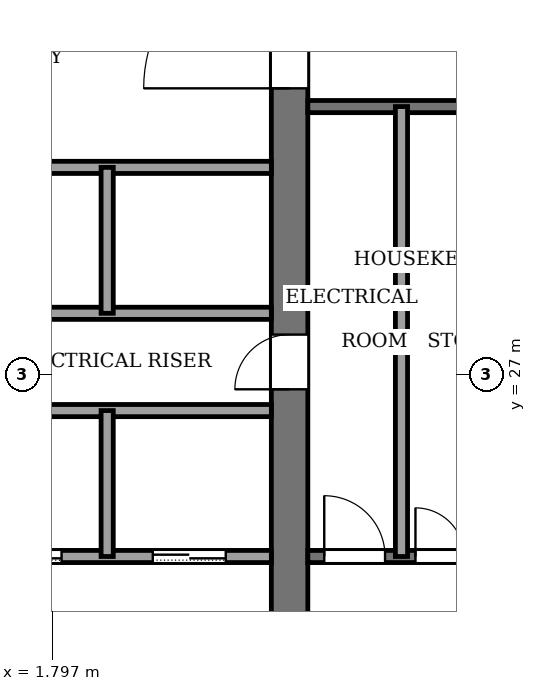
"""IFC4 building model, lengths in metres.
Left out: names, types, materials, properties, quantities, classifications, styles, units other than length and angle.
Written with IfcOpenShell. Run it as: python <this file> out.ifc"""

import sys

from ifc_helpers import new_model, si_unit, direction, frame, frame_2d, origin, place, context, subcontext, project, spatial, rectangle, extrude, element, fill, save


model = new_model("IFC4")
c1 = context("Model", 3, precision=1e-05, world=origin(), true_north=direction((0.0, 1.0)))
c2 = subcontext(c1, "Body", "Model", "MODEL_VIEW")
j1 = project(units=[si_unit("LENGTHUNIT", "METRE"), si_unit("PLANEANGLEUNIT", "RADIAN")], contexts=[c1])
p1 = place(None, origin())
s1 = spatial("IfcSite", under=j1, at=p1, CompositionType="ELEMENT")
p2 = place(p1, origin())
s2 = spatial("IfcBuilding", under=s1, at=p2, CompositionType="ELEMENT")
p3 = place(p2, frame((0.0, 0.0, 134.0)))
s3 = spatial("IfcBuildingStorey", under=s2, at=p3, CompositionType="ELEMENT", Elevation=134.0)
p4 = place(p3, frame((5.7, 18.4, -0.13), z_axis=(0.0, 0.0, 1.0), x_axis=(0.0, 1.0, 0.0)))
e1 = element("IfcWall", 1, at=p4, inside=s3, PredefinedType="SHEAR", context=c2, shape_type="SweptSolid", body=[
    extrude(rectangle(XDim=19.2, YDim=0.6, at=frame_2d((9.6, 0.0))), origin(), (0.0, 0.0, 1.0), 4.0),
])
p5 = place(p4, frame((8.35, 0.0, 0.13)))
e2 = element("IfcOpeningElement", 2, at=p5, cuts=e1, PredefinedType="OPENING", context=c2, shape_type="SweptSolid", body=[
    extrude(rectangle(XDim=0.9, YDim=2.1, at=frame_2d((0.45, 1.05))), frame((0.0, 0.31, 0.0), z_axis=(0.0, -1.0, 0.0), x_axis=(1.0, 0.0, 0.0)), (0.0, 0.0, 1.0), 0.62),
])
p6 = place(p4, frame((13.3, 0.0, 0.13)))
e3 = element("IfcOpeningElement", 3, at=p6, cuts=e1, PredefinedType="OPENING", context=c2, shape_type="SweptSolid", body=[
    extrude(rectangle(XDim=2.4, YDim=2.4, at=frame_2d((1.2, 1.2))), frame((0.0, 0.31, 0.0), z_axis=(0.0, -1.0, 0.0), x_axis=(1.0, 0.0, 0.0)), (0.0, 0.0, 1.0), 0.62),
])
p7 = place(p3, frame((-5.4, 24.0, 0.0), z_axis=(0.0, 0.0, 1.0), x_axis=(1.0, 0.0, 0.0)))
e4 = element("IfcWall", 4, at=p7, inside=s3, PredefinedType="PARTITIONING", context=c2, shape_type="SweptSolid", body=[
    extrude(rectangle(XDim=10.8, YDim=0.2, at=frame_2d((5.4, 0.0))), origin(), (0.0, 0.0, 1.0), 3.87),
])
p8 = place(p7, frame((0.75, 0.0, 0.0)))
e5 = element("IfcOpeningElement", 5, at=p8, cuts=e4, PredefinedType="OPENING", context=c2, shape_type="SweptSolid", body=[
    extrude(rectangle(XDim=1.2, YDim=2.2, at=frame_2d((0.6, 1.1))), frame((0.0, 0.11, 0.0), z_axis=(0.0, -1.0, 0.0), x_axis=(1.0, 0.0, 0.0)), (0.0, 0.0, 1.0), 0.22),
])
p9 = place(p7, frame((3.45, 0.0, 0.0)))
e6 = element("IfcOpeningElement", 6, at=p9, cuts=e4, PredefinedType="OPENING", context=c2, shape_type="SweptSolid", body=[
    extrude(rectangle(XDim=1.2, YDim=2.2, at=frame_2d((0.6, 1.1))), frame((0.0, 0.11, 0.0), z_axis=(0.0, -1.0, 0.0), x_axis=(1.0, 0.0, 0.0)), (0.0, 0.0, 1.0), 0.22),
])
p10 = place(p7, frame((6.15, 0.0, 0.0)))
e7 = element("IfcOpeningElement", 7, at=p10, cuts=e4, PredefinedType="OPENING", context=c2, shape_type="SweptSolid", body=[
    extrude(rectangle(XDim=1.2, YDim=2.2, at=frame_2d((0.6, 1.1))), frame((0.0, 0.11, 0.0), z_axis=(0.0, -1.0, 0.0), x_axis=(1.0, 0.0, 0.0)), (0.0, 0.0, 1.0), 0.22),
])
p11 = place(p7, frame((8.85, 0.0, 0.0)))
e8 = element("IfcOpeningElement", 8, at=p11, cuts=e4, PredefinedType="OPENING", context=c2, shape_type="SweptSolid", body=[
    extrude(rectangle(XDim=1.2, YDim=2.2, at=frame_2d((0.6, 1.1))), frame((0.0, 0.11, 0.0), z_axis=(0.0, -1.0, 0.0), x_axis=(1.0, 0.0, 0.0)), (0.0, 0.0, 1.0), 0.22),
])
p12 = place(p3, frame((6.0, 24.0, 0.0), z_axis=(0.0, 0.0, 1.0), x_axis=(1.0, 0.0, 0.0)))
e9 = element("IfcWall", 9, at=p12, inside=s3, PredefinedType="PARTITIONING", context=c2, shape_type="SweptSolid", body=[
    extrude(rectangle(XDim=6.6, YDim=0.2, at=frame_2d((3.3, 0.0))), origin(), (0.0, 0.0, 1.0), 3.87),
])
p13 = place(p12, frame((0.27, 0.0, 0.0)))
e10 = element("IfcOpeningElement", 10, at=p13, cuts=e9, PredefinedType="OPENING", context=c2, shape_type="SweptSolid", body=[
    extrude(rectangle(XDim=1.0, YDim=2.1, at=frame_2d((0.5, 1.05))), frame((0.0, 0.11, 0.0), z_axis=(0.0, -1.0, 0.0), x_axis=(1.0, 0.0, 0.0)), (0.0, 0.0, 1.0), 0.22),
])
p14 = place(p12, frame((1.77, 0.0, 0.0)))
e11 = element("IfcOpeningElement", 11, at=p14, cuts=e9, PredefinedType="OPENING", context=c2, shape_type="SweptSolid", body=[
    extrude(rectangle(XDim=0.8, YDim=2.1, at=frame_2d((0.4, 1.05))), frame((0.0, 0.11, 0.0), z_axis=(0.0, -1.0, 0.0), x_axis=(1.0, 0.0, 0.0)), (0.0, 0.0, 1.0), 0.22),
])
p15 = place(p12, frame((4.4, 0.0, 0.0)))
e12 = element("IfcOpeningElement", 12, at=p15, cuts=e9, PredefinedType="OPENING", context=c2, shape_type="SweptSolid", body=[
    extrude(rectangle(XDim=1.2, YDim=2.2, at=frame_2d((0.6, 1.1))), frame((0.0, 0.11, 0.0), z_axis=(0.0, -1.0, 0.0), x_axis=(1.0, 0.0, 0.0)), (0.0, 0.0, 1.0), 0.22),
])
for number, where, z_axis, x_axis in (
    (13, (-5.4, 26.4, 0.0), (0.0, 0.0, 1.0), (1.0, 0.0, 0.0)),
    (14, (-5.4, 28.0, 0.0), (0.0, 0.0, 1.0), (1.0, 0.0, 0.0)),
    (15, (-5.4, 30.4, 0.0), (0.0, 0.0, 1.0), (1.0, 0.0, 0.0)),
):
    element("IfcWall", number, at=place(p3, frame(where, z_axis=z_axis, x_axis=x_axis)), inside=s3, PredefinedType="PARTITIONING", context=c2, shape_type="SweptSolid", body=[
        extrude(rectangle(XDim=10.8, YDim=0.2, at=frame_2d((5.4, 0.0))), origin(), (0.0, 0.0, 1.0), 3.87),
    ])
p16 = place(p3, frame((6.0, 31.4, 0.0), z_axis=(0.0, 0.0, 1.0), x_axis=(1.0, 0.0, 0.0)))
e16 = element("IfcWall", 16, at=p16, inside=s3, PredefinedType="PARTITIONING", context=c2, shape_type="SweptSolid", body=[
    extrude(rectangle(XDim=6.6, YDim=0.2, at=frame_2d((3.3, 0.0))), origin(), (0.0, 0.0, 1.0), 3.87),
])
for number, where, z_axis, x_axis in (
    (17, (2.7, 24.0, 0.0), (0.0, 0.0, 1.0), (0.0, 1.0, 0.0)),
    (18, (2.7, 28.0, 0.0), (0.0, 0.0, 1.0), (0.0, 1.0, 0.0)),
):
    element("IfcWall", number, at=place(p3, frame(where, z_axis=z_axis, x_axis=x_axis)), inside=s3, PredefinedType="PARTITIONING", context=c2, shape_type="SweptSolid", body=[
        extrude(rectangle(XDim=2.4, YDim=0.2, at=frame_2d((1.2, 0.0))), origin(), (0.0, 0.0, 1.0), 3.87),
    ])
p17 = place(p3, frame((7.54, 24.0, 0.0), z_axis=(0.0, 0.0, 1.0), x_axis=(0.0, 1.0, 0.0)))
e19 = element("IfcWall", 19, at=p17, inside=s3, PredefinedType="PARTITIONING", context=c2, shape_type="SweptSolid", body=[
    extrude(rectangle(XDim=7.4, YDim=0.2, at=frame_2d((3.7, 0.0))), origin(), (0.0, 0.0, 1.0), 3.87),
])
p18 = place(p10, origin())
e20 = element("IfcDoor", 20, at=p18, inside=s3, OperationType="SLIDING_TO_LEFT", PredefinedType="DOOR", context=c2, shape_type="SweptSolid", body=[
    extrude(rectangle(XDim=1.2, YDim=2.2, at=frame_2d((0.6, 1.1))), frame((0.0, 0.025, 0.0), z_axis=(0.0, -1.0, 0.0), x_axis=(1.0, 0.0, 0.0)), (0.0, 0.0, 1.0), 0.05),
])
fill(e7, e20)
p19 = place(p11, origin())
e21 = element("IfcDoor", 21, at=p19, inside=s3, OperationType="SLIDING_TO_LEFT", PredefinedType="DOOR", context=c2, shape_type="SweptSolid", body=[
    extrude(rectangle(XDim=1.2, YDim=2.2, at=frame_2d((0.6, 1.1))), frame((0.0, 0.025, 0.0), z_axis=(0.0, -1.0, 0.0), x_axis=(1.0, 0.0, 0.0)), (0.0, 0.0, 1.0), 0.05),
])
fill(e8, e21)
p20 = place(p13, origin())
e22 = element("IfcDoor", 22, at=p20, inside=s3, OperationType="SINGLE_SWING_RIGHT", PredefinedType="DOOR", context=c2, shape_type="SweptSolid", body=[
    extrude(rectangle(XDim=1.0, YDim=2.1, at=frame_2d((0.5, 1.05))), frame((0.0, 0.025, 0.0), z_axis=(0.0, -1.0, 0.0), x_axis=(1.0, 0.0, 0.0)), (0.0, 0.0, 1.0), 0.05),
])
fill(e10, e22)
p21 = place(p14, origin())
e23 = element("IfcDoor", 23, at=p21, inside=s3, OperationType="SINGLE_SWING_LEFT", PredefinedType="DOOR", context=c2, shape_type="SweptSolid", body=[
    extrude(rectangle(XDim=0.8, YDim=2.1, at=frame_2d((0.4, 1.05))), frame((0.0, 0.025, 0.0), z_axis=(0.0, -1.0, 0.0), x_axis=(1.0, 0.0, 0.0)), (0.0, 0.0, 1.0), 0.05),
])
fill(e11, e23)
p22 = place(p5, origin())
e24 = element("IfcDoor", 24, at=p22, inside=s3, OperationType="SINGLE_SWING_LEFT", PredefinedType="DOOR", context=c2, shape_type="SweptSolid", body=[
    extrude(rectangle(XDim=0.9, YDim=2.1, at=frame_2d((0.45, 1.05))), frame((0.0, 0.025, 0.0), z_axis=(0.0, -1.0, 0.0), x_axis=(1.0, 0.0, 0.0)), (0.0, 0.0, 1.0), 0.05),
])
fill(e2, e24)
p23 = place(p6, origin())
e25 = element("IfcDoor", 25, at=p23, inside=s3, OperationType="DOUBLE_DOOR_SINGLE_SWING", PredefinedType="DOOR", context=c2, shape_type="SweptSolid", body=[
    extrude(rectangle(XDim=2.4, YDim=2.4, at=frame_2d((1.2, 1.2))), frame((0.0, 0.025, 0.0), z_axis=(0.0, -1.0, 0.0), x_axis=(1.0, 0.0, 0.0)), (0.0, 0.0, 1.0), 0.05),
])
fill(e3, e25)
save(model, sys.argv[1])
